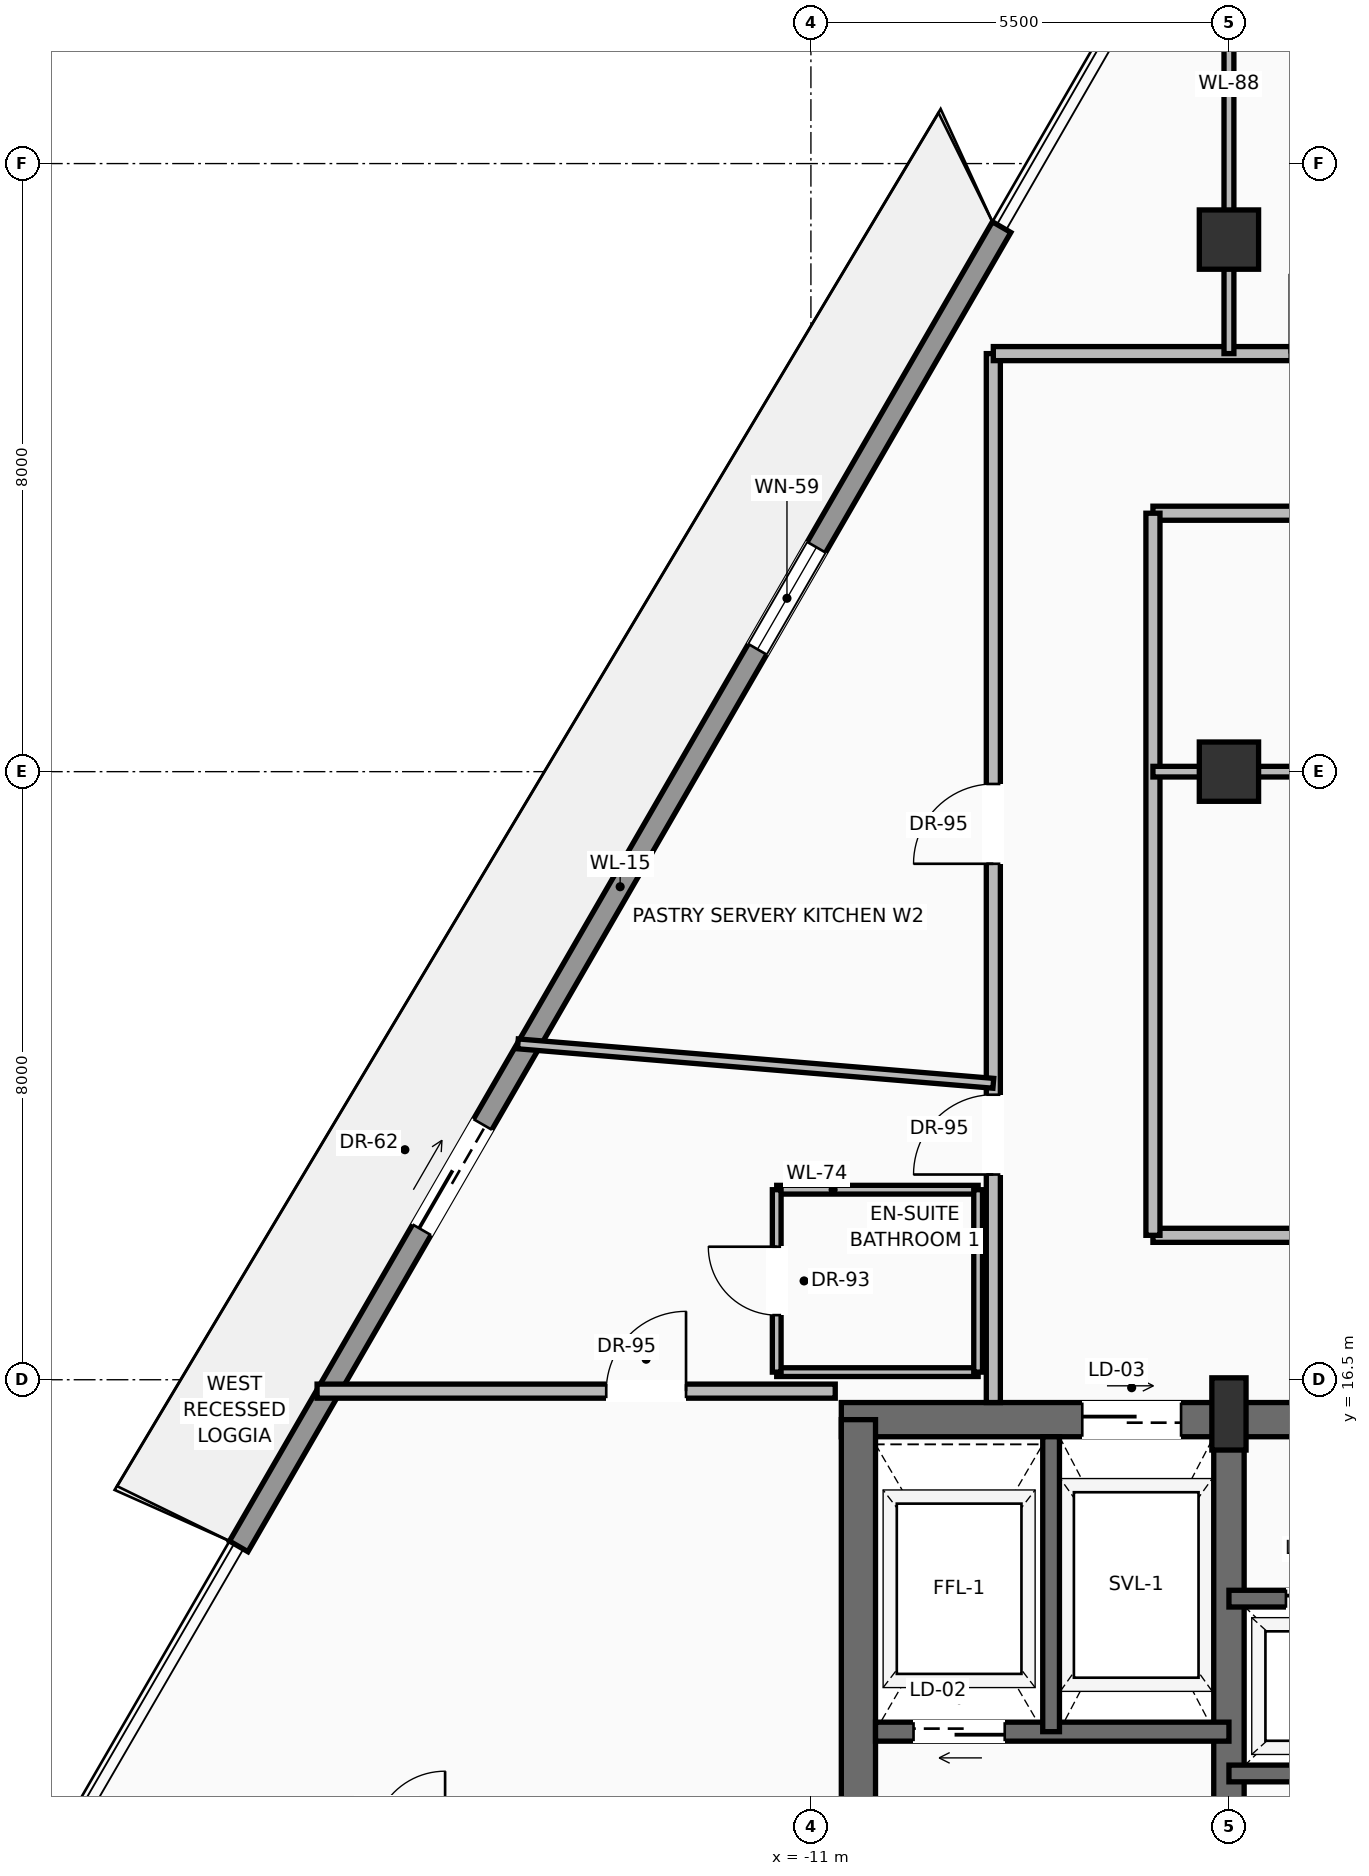
"""IFC4 building model, lengths in metres.
Left out: names, types, materials, properties, quantities, classifications, styles, units other than length and angle.
Written with IfcOpenShell. Run it as: python <this file> out.ifc"""

import sys

from ifc_helpers import new_model, si_unit, direction, frame, frame_2d, origin, origin_2d, place, context, subcontext, project, spatial, rectangle, extrude, source, transform, mapped, element, fill, save


model = new_model("IFC4")
c1 = context("Model", 3, precision=1e-05, world=origin(), true_north=direction((0.0, 1.0)))
c2 = subcontext(c1, "Body", "Model", "MODEL_VIEW")
j1 = project(units=[si_unit("LENGTHUNIT", "METRE"), si_unit("PLANEANGLEUNIT", "RADIAN")], contexts=[c1])
p1 = place(None, origin())
s1 = spatial("IfcSite", under=j1, at=p1, CompositionType="ELEMENT")
p2 = place(p1, origin())
s2 = spatial("IfcBuilding", under=s1, at=p2, CompositionType="ELEMENT")
p3 = place(p2, frame((0.0, 0.0, 273.0)))
s3 = spatial("IfcBuildingStorey", under=s2, at=p3, CompositionType="ELEMENT", Elevation=273.0)
p4 = place(p3, frame((-10.6, 15.975, 0.0), z_axis=(0.0, 0.0, 1.0), x_axis=(1.0, 0.0, 0.0)))
e1 = element("IfcWall", 1, at=p4, inside=s3, PredefinedType="SHEAR", context=c2, shape_type="SweptSolid", body=[
    extrude(rectangle(XDim=21.2, YDim=0.45, at=frame_2d((10.6, 0.0))), origin(), (0.0, 0.0, 1.0), 3.24),
])
p5 = place(p4, frame((3.17, 0.0, 0.0)))
e2 = element("IfcOpeningElement", 2, at=p5, cuts=e1, PredefinedType="OPENING", context=c2, shape_type="SweptSolid", body=[
    extrude(rectangle(XDim=1.3, YDim=2.3, at=frame_2d((0.65, 1.15))), frame((0.0, 0.235, 0.0), z_axis=(0.0, -1.0, 0.0), x_axis=(1.0, 0.0, 0.0)), (0.0, 0.0, 1.0), 0.47),
])
p6 = place(p4, frame((9.6, 0.0, 0.0)))
e3 = element("IfcOpeningElement", 3, at=p6, cuts=e1, PredefinedType="OPENING", context=c2, shape_type="SweptSolid", body=[
    extrude(rectangle(XDim=2.0, YDim=2.4, at=frame_2d((1.0, 1.2))), frame((0.0, 0.235, 0.0), z_axis=(0.0, -1.0, 0.0), x_axis=(1.0, 0.0, 0.0)), (0.0, 0.0, 1.0), 0.47),
])
p7 = place(p3, frame((-10.375, 0.625, 0.0), z_axis=(0.0, 0.0, 1.0), x_axis=(0.0, 1.0, 0.0)))
e4 = element("IfcWall", 4, at=p7, inside=s3, PredefinedType="SHEAR", context=c2, shape_type="SweptSolid", body=[
    extrude(rectangle(XDim=15.35, YDim=0.45, at=frame_2d((7.675, 0.0))), origin(), (0.0, 0.0, 1.0), 3.24),
])
p8 = place(p3, frame((-5.5, 0.625, 0.0), z_axis=(0.0, 0.0, 1.0), x_axis=(0.0, 1.0, 0.0)))
e5 = element("IfcWall", 5, at=p8, inside=s3, PredefinedType="SHEAR", context=c2, shape_type="SweptSolid", body=[
    extrude(rectangle(XDim=15.35, YDim=0.4, at=frame_2d((7.675, 0.0))), origin(), (0.0, 0.0, 1.0), 3.24),
])
p9 = place(p8, frame((8.875, 0.0, 0.0)))
e6 = element("IfcOpeningElement", 6, at=p9, cuts=e5, PredefinedType="OPENING", context=c2, shape_type="SweptSolid", body=[
    extrude(rectangle(XDim=1.1, YDim=2.2, at=frame_2d((0.55, 1.1))), frame((0.0, 0.21, 0.0), z_axis=(0.0, -1.0, 0.0), x_axis=(1.0, 0.0, 0.0)), (0.0, 0.0, 1.0), 0.42),
])
m1 = source(origin(), c2, "Body", "SweptSolid", [
    extrude(rectangle(XDim=0.45, YDim=0.95, at=origin_2d()), origin(), (0.0, 0.0, 1.0), 3.45),
])
p10 = place(p3, frame((-5.5, 16.05, 0.0), z_axis=(0.0, 0.0, 1.0), x_axis=(1.0, 0.0, 0.0)))
e7 = element("IfcColumn", 7, at=p10, inside=s3, PredefinedType="PILASTER", context=c2, shape_type="MappedRepresentation", body=[
    mapped(m1, transform((0.0, 0.0, 0.0), scale=1.0)),
])
m2 = source(origin(), c2, "Body", "SweptSolid", [
    extrude(rectangle(XDim=0.78, YDim=0.78, at=origin_2d()), origin(), (0.0, 0.0, 1.0), 3.45),
])
for number, where, z_axis, x_axis in (
    (8, (-5.5, 24.5, 0.0), (0.0, 0.0, 1.0), (1.0, 0.0, 0.0)),
    (9, (-5.5, 31.5, 0.0), (0.0, 0.0, 1.0), (1.0, 0.0, 0.0)),
):
    element("IfcColumn", number, at=place(p3, frame(where, z_axis=z_axis, x_axis=x_axis)), inside=s3, PredefinedType="COLUMN", context=c2, shape_type="MappedRepresentation", body=[
        mapped(m2, transform((0.0, 0.0, 0.0), scale=1.0)),
    ])
p11 = place(p3, frame((-18.529, 14.308, 0.0), z_axis=(0.0, 0.0, 1.0), x_axis=(0.500615740451, 0.86566961389, 0.0)))
e10 = element("IfcWall", 10, at=p11, inside=s3, PredefinedType="SOLIDWALL", context=c2, shape_type="SweptSolid", body=[
    extrude(rectangle(XDim=20.05, YDim=0.28, at=frame_2d((10.025, 0.0))), origin(), (0.0, 0.0, 1.0), 2.82),
])
p12 = place(p11, frame((4.812, 0.0, 0.0)))
e11 = element("IfcOpeningElement", 11, at=p12, cuts=e10, PredefinedType="OPENING", context=c2, shape_type="SweptSolid", body=[
    extrude(rectangle(XDim=1.6, YDim=2.35, at=frame_2d((0.8, 1.175))), frame((0.0, 0.15, 0.0), z_axis=(0.0, -1.0, 0.0), x_axis=(1.0, 0.0, 0.0)), (0.0, 0.0, 1.0), 0.3),
])
p13 = place(p11, frame((13.634, 0.0, 0.9)))
e12 = element("IfcOpeningElement", 12, at=p13, cuts=e10, PredefinedType="OPENING", context=c2, shape_type="SweptSolid", body=[
    extrude(rectangle(XDim=1.55, YDim=1.75, at=frame_2d((0.775, 0.875))), frame((0.0, 0.15, 0.0), z_axis=(0.0, -1.0, 0.0), x_axis=(1.0, 0.0, 0.0)), (0.0, 0.0, 1.0), 0.3),
])
p14 = place(p3, frame((-5.5, 11.87, 0.0), z_axis=(0.0, 0.0, 1.0), x_axis=(-1.0, 0.0, 0.0)))
e13 = element("IfcWall", 13, at=p14, inside=s3, PredefinedType="SOLIDWALL", context=c2, shape_type="SweptSolid", body=[
    extrude(rectangle(XDim=4.65, YDim=0.25, at=frame_2d((2.325, 0.0))), origin(), (0.0, 0.0, 1.0), 3.24),
])
p15 = place(p14, frame((2.95, 0.0, 0.0)))
e14 = element("IfcOpeningElement", 14, at=p15, cuts=e13, PredefinedType="OPENING", context=c2, shape_type="SweptSolid", body=[
    extrude(rectangle(XDim=1.2, YDim=2.25, at=frame_2d((0.6, 1.125))), frame((0.0, 0.135, 0.0), z_axis=(0.0, -1.0, 0.0), x_axis=(1.0, 0.0, 0.0)), (0.0, 0.0, 1.0), 0.27),
])
p16 = place(p3, frame((-7.84, 11.87, 0.0), z_axis=(0.0, 0.0, 1.0), x_axis=(0.0, 1.0, 0.0)))
e15 = element("IfcWall", 15, at=p16, inside=s3, PredefinedType="SOLIDWALL", context=c2, shape_type="SweptSolid", body=[
    extrude(rectangle(XDim=3.88, YDim=0.22, at=frame_2d((1.94, 0.0))), origin(), (0.0, 0.0, 1.0), 3.24),
])
p17 = place(p3, frame((-5.5, 11.32, 0.0), z_axis=(0.0, 0.0, 1.0), x_axis=(1.0, 0.0, 0.0)))
e16 = element("IfcWall", 16, at=p17, inside=s3, PredefinedType="SOLIDWALL", context=c2, shape_type="SweptSolid", body=[
    extrude(rectangle(XDim=7.32, YDim=0.22, at=frame_2d((3.66, 0.0))), origin(), (0.0, 0.0, 1.0), 3.24),
])
p18 = place(p3, frame((-5.5, 13.62, 0.0), z_axis=(0.0, 0.0, 1.0), x_axis=(1.0, 0.0, 0.0)))
e17 = element("IfcWall", 17, at=p18, inside=s3, PredefinedType="SOLIDWALL", context=c2, shape_type="SweptSolid", body=[
    extrude(rectangle(XDim=7.32, YDim=0.22, at=frame_2d((3.66, 0.0))), origin(), (0.0, 0.0, 1.0), 3.24),
])
p19 = place(p18, frame((0.75, 0.0, 0.0)))
e18 = element("IfcOpeningElement", 18, at=p19, cuts=e17, PredefinedType="OPENING", context=c2, shape_type="SweptSolid", body=[
    extrude(rectangle(XDim=1.1, YDim=2.2, at=frame_2d((0.55, 1.1))), frame((0.0, 0.12, 0.0), z_axis=(0.0, -1.0, 0.0), x_axis=(1.0, 0.0, 0.0)), (0.0, 0.0, 1.0), 0.24),
])
p20 = place(p18, frame((3.15, 0.0, 0.0)))
e19 = element("IfcOpeningElement", 19, at=p20, cuts=e17, PredefinedType="OPENING", context=c2, shape_type="SweptSolid", body=[
    extrude(rectangle(XDim=1.1, YDim=2.2, at=frame_2d((0.55, 1.1))), frame((0.0, 0.12, 0.0), z_axis=(0.0, -1.0, 0.0), x_axis=(1.0, 0.0, 0.0)), (0.0, 0.0, 1.0), 0.24),
])
p21 = place(p18, frame((5.55, 0.0, 0.0)))
e20 = element("IfcOpeningElement", 20, at=p21, cuts=e17, PredefinedType="OPENING", context=c2, shape_type="SweptSolid", body=[
    extrude(rectangle(XDim=1.1, YDim=2.2, at=frame_2d((0.55, 1.1))), frame((0.0, 0.12, 0.0), z_axis=(0.0, -1.0, 0.0), x_axis=(1.0, 0.0, 0.0)), (0.0, 0.0, 1.0), 0.24),
])
p22 = place(p3, frame((-6.5, 18.4, 0.0), z_axis=(0.0, 0.0, 1.0), x_axis=(1.0, 0.0, 0.0)))
e21 = element("IfcWall", 21, at=p22, inside=s3, PredefinedType="PARTITIONING", context=c2, shape_type="SweptSolid", body=[
    extrude(rectangle(XDim=12.45, YDim=0.185, at=frame_2d((6.225, 0.0))), origin(), (0.0, 0.0, 1.0), 3.232),
])
p23 = place(p22, frame((5.75, 0.0, 0.0)))
e22 = element("IfcOpeningElement", 22, at=p23, cuts=e21, PredefinedType="OPENING", context=c2, shape_type="SweptSolid", body=[
    extrude(rectangle(XDim=0.95, YDim=2.2, at=frame_2d((0.475, 1.1))), frame((0.0, 0.103, 0.0), z_axis=(0.0, -1.0, 0.0), x_axis=(1.0, 0.0, 0.0)), (0.0, 0.0, 1.0), 0.205),
])
p24 = place(p3, frame((-6.5, 27.9, 0.0), z_axis=(0.0, 0.0, 1.0), x_axis=(1.0, 0.0, 0.0)))
e23 = element("IfcWall", 23, at=p24, inside=s3, PredefinedType="PARTITIONING", context=c2, shape_type="SweptSolid", body=[
    extrude(rectangle(XDim=12.45, YDim=0.185, at=frame_2d((6.225, 0.0))), origin(), (0.0, 0.0, 1.0), 2.885),
])
p25 = place(p24, frame((5.75, 0.0, 0.0)))
e24 = element("IfcOpeningElement", 24, at=p25, cuts=e23, PredefinedType="OPENING", context=c2, shape_type="SweptSolid", body=[
    extrude(rectangle(XDim=0.95, YDim=2.2, at=frame_2d((0.475, 1.1))), frame((0.0, 0.103, 0.0), z_axis=(0.0, -1.0, 0.0), x_axis=(1.0, 0.0, 0.0)), (0.0, 0.0, 1.0), 0.205),
])
p26 = place(p3, frame((-6.5, 18.4, 0.0), z_axis=(0.0, 0.0, 1.0), x_axis=(0.0, 1.0, 0.0)))
e25 = element("IfcWall", 25, at=p26, inside=s3, PredefinedType="PARTITIONING", context=c2, shape_type="SweptSolid", body=[
    extrude(rectangle(XDim=9.5, YDim=0.185, at=frame_2d((4.75, 0.0))), origin(), (0.0, 0.0, 1.0), 3.232),
])
p27 = place(p3, frame((-8.6, 16.2, 0.0), z_axis=(0.0, 0.0, 1.0), x_axis=(0.0, 1.0, 0.0)))
e26 = element("IfcWall", 26, at=p27, inside=s3, PredefinedType="PARTITIONING", context=c2, shape_type="SweptSolid", body=[
    extrude(rectangle(XDim=13.8, YDim=0.185, at=frame_2d((6.9, 0.0))), origin(), (0.0, 0.0, 1.0), 3.232),
])
p28 = place(p27, frame((3.0, 0.0, 0.0)))
e27 = element("IfcOpeningElement", 27, at=p28, cuts=e26, PredefinedType="OPENING", context=c2, shape_type="SweptSolid", body=[
    extrude(rectangle(XDim=1.05, YDim=2.25, at=frame_2d((0.525, 1.125))), frame((0.0, 0.103, 0.0), z_axis=(0.0, -1.0, 0.0), x_axis=(1.0, 0.0, 0.0)), (0.0, 0.0, 1.0), 0.205),
])
p29 = place(p27, frame((7.088, 0.0, 0.0)))
e28 = element("IfcOpeningElement", 28, at=p29, cuts=e26, PredefinedType="OPENING", context=c2, shape_type="SweptSolid", body=[
    extrude(rectangle(XDim=1.05, YDim=2.25, at=frame_2d((0.525, 1.125))), frame((0.0, 0.103, 0.0), z_axis=(0.0, -1.0, 0.0), x_axis=(1.0, 0.0, 0.0)), (0.0, 0.0, 1.0), 0.205),
])
p30 = place(p3, frame((-8.6, 30.0, 0.0), z_axis=(0.0, 0.0, 1.0), x_axis=(1.0, 0.0, 0.0)))
e29 = element("IfcWall", 29, at=p30, inside=s3, PredefinedType="PARTITIONING", context=c2, shape_type="SweptSolid", body=[
    extrude(rectangle(XDim=16.65, YDim=0.185, at=frame_2d((8.325, 0.0))), origin(), (0.0, 0.0, 1.0), 3.232),
])
p31 = place(p30, frame((3.9, 0.0, 0.0)))
e30 = element("IfcOpeningElement", 30, at=p31, cuts=e29, PredefinedType="OPENING", context=c2, shape_type="SweptSolid", body=[
    extrude(rectangle(XDim=1.05, YDim=2.25, at=frame_2d((0.525, 1.125))), frame((0.0, 0.103, 0.0), z_axis=(0.0, -1.0, 0.0), x_axis=(1.0, 0.0, 0.0)), (0.0, 0.0, 1.0), 0.205),
])
p32 = place(p30, frame((7.8, 0.0, 0.0)))
e31 = element("IfcOpeningElement", 31, at=p32, cuts=e29, PredefinedType="OPENING", context=c2, shape_type="SweptSolid", body=[
    extrude(rectangle(XDim=1.05, YDim=2.25, at=frame_2d((0.525, 1.125))), frame((0.0, 0.103, 0.0), z_axis=(0.0, -1.0, 0.0), x_axis=(1.0, 0.0, 0.0)), (0.0, 0.0, 1.0), 0.205),
])
p33 = place(p30, frame((12.25, 0.0, 0.0)))
e32 = element("IfcOpeningElement", 32, at=p33, cuts=e29, PredefinedType="OPENING", context=c2, shape_type="SweptSolid", body=[
    extrude(rectangle(XDim=1.05, YDim=2.25, at=frame_2d((0.525, 1.125))), frame((0.0, 0.103, 0.0), z_axis=(0.0, -1.0, 0.0), x_axis=(1.0, 0.0, 0.0)), (0.0, 0.0, 1.0), 0.205),
])
p34 = place(p3, frame((-6.5, 24.5, 0.0), z_axis=(0.0, 0.0, 1.0), x_axis=(1.0, 0.0, 0.0)))
e33 = element("IfcWall", 33, at=p34, inside=s3, PredefinedType="PARTITIONING", context=c2, shape_type="SweptSolid", body=[
    extrude(rectangle(XDim=12.45, YDim=0.14, at=frame_2d((6.225, 0.0))), origin(), (0.0, 0.0, 1.0), 2.683),
])
p35 = place(p3, frame((-17.498, 16.35, 0.0), z_axis=(0.0, 0.0, 1.0), x_axis=(1.0, 0.0, 0.0)))
e34 = element("IfcWall", 34, at=p35, inside=s3, PredefinedType="PARTITIONING", context=c2, shape_type="SweptSolid", body=[
    extrude(rectangle(XDim=6.818, YDim=0.185, at=frame_2d((3.409, 0.0))), origin(), (0.0, 0.0, 1.0), 3.232),
])
p36 = place(p35, frame((3.804, 0.0, 0.0)))
e35 = element("IfcOpeningElement", 35, at=p36, cuts=e34, PredefinedType="OPENING", context=c2, shape_type="SweptSolid", body=[
    extrude(rectangle(XDim=1.05, YDim=2.25, at=frame_2d((0.525, 1.125))), frame((0.0, 0.103, 0.0), z_axis=(0.0, -1.0, 0.0), x_axis=(1.0, 0.0, 0.0)), (0.0, 0.0, 1.0), 0.205),
])
p37 = place(p3, frame((-5.5, 30.0, 0.0), z_axis=(0.0, 0.0, 1.0), x_axis=(0.0, 1.0, 0.0)))
e36 = element("IfcWall", 36, at=p37, inside=s3, PredefinedType="PARTITIONING", context=c2, shape_type="SweptSolid", body=[
    extrude(rectangle(XDim=7.096, YDim=0.13, at=frame_2d((3.548, 0.0))), origin(), (0.0, 0.0, 1.0), 2.683),
])
for number, where, z_axis, x_axis in (
    (37, (-11.45, 16.6, 0.0), (0.0, 0.0, 1.0), (1.0, 0.0, 0.0)),
    (38, (-11.45, 19.0, 0.0), (0.0, 0.0, 1.0), (1.0, 0.0, 0.0)),
):
    element("IfcWall", number, at=place(p3, frame(where, z_axis=z_axis, x_axis=x_axis)), inside=s3, PredefinedType="PARTITIONING", context=c2, shape_type="SweptSolid", body=[
        extrude(rectangle(XDim=2.65, YDim=0.115, at=frame_2d((1.325, 0.0))), origin(), (0.0, 0.0, 1.0), 3.232),
    ])
p38 = place(p3, frame((-11.45, 16.6, 0.0), z_axis=(0.0, 0.0, 1.0), x_axis=(0.0, 1.0, 0.0)))
e39 = element("IfcWall", 39, at=p38, inside=s3, PredefinedType="PARTITIONING", context=c2, shape_type="SweptSolid", body=[
    extrude(rectangle(XDim=2.4, YDim=0.115, at=frame_2d((1.2, 0.0))), origin(), (0.0, 0.0, 1.0), 3.232),
])
p39 = place(p38, frame((0.75, 0.0, 0.0)))
e40 = element("IfcOpeningElement", 40, at=p39, cuts=e39, PredefinedType="OPENING", context=c2, shape_type="SweptSolid", body=[
    extrude(rectangle(XDim=0.9, YDim=2.15, at=frame_2d((0.45, 1.075))), frame((0.0, 0.067, 0.0), z_axis=(0.0, -1.0, 0.0), x_axis=(1.0, 0.0, 0.0)), (0.0, 0.0, 1.0), 0.135),
])
p40 = place(p3, frame((-8.8, 16.6, 0.0), z_axis=(0.0, 0.0, 1.0), x_axis=(0.0, 1.0, 0.0)))
e41 = element("IfcWall", 41, at=p40, inside=s3, PredefinedType="PARTITIONING", context=c2, shape_type="SweptSolid", body=[
    extrude(rectangle(XDim=2.4, YDim=0.115, at=frame_2d((1.2, 0.0))), origin(), (0.0, 0.0, 1.0), 3.232),
])
p41 = place(p3, frame((-14.855, 20.919, 0.0), z_axis=(0.0, 0.0, 1.0), x_axis=(0.996575202115, -0.082691393322, 0.0)))
e42 = element("IfcWall", 42, at=p41, inside=s3, PredefinedType="PARTITIONING", context=c2, shape_type="SweptSolid", body=[
    extrude(rectangle(XDim=6.277, YDim=0.13, at=frame_2d((3.138, 0.0))), origin(), (0.0, 0.0, 1.0), 3.232),
])
m3 = source(origin(), c2, "Body", "SweptSolid", [
    extrude(rectangle(XDim=1.6, YDim=2.35, at=frame_2d((0.8, 1.175))), frame((0.0, 0.025, 0.0), z_axis=(0.0, -1.0, 0.0), x_axis=(1.0, 0.0, 0.0)), (0.0, 0.0, 1.0), 0.05),
])
p42 = place(p12, origin())
e43 = element("IfcDoor", 43, at=p42, inside=s3, OperationType="SLIDING_TO_LEFT", PredefinedType="DOOR", context=c2, shape_type="MappedRepresentation", body=[
    mapped(m3, transform((0.0, 0.0, 0.0), scale=1.0)),
])
fill(e11, e43)
m4 = source(origin(), c2, "Body", "SweptSolid", [
    extrude(rectangle(XDim=1.55, YDim=1.75, at=frame_2d((0.775, 0.875))), frame((0.0, 0.03, 0.0), z_axis=(0.0, -1.0, 0.0), x_axis=(1.0, 0.0, 0.0)), (0.0, 0.0, 1.0), 0.06),
])
p43 = place(p13, origin())
e44 = element("IfcWindow", 44, at=p43, inside=s3, PartitioningType="SINGLE_PANEL", PredefinedType="WINDOW", context=c2, shape_type="MappedRepresentation", body=[
    mapped(m4, transform((0.0, 0.0, 0.0), scale=1.0)),
])
fill(e12, e44)
m5 = source(origin(), c2, "Body", "SweptSolid", [
    extrude(rectangle(XDim=1.2, YDim=2.25, at=frame_2d((0.6, 1.125))), frame((0.0, 0.025, 0.0), z_axis=(0.0, -1.0, 0.0), x_axis=(1.0, 0.0, 0.0)), (0.0, 0.0, 1.0), 0.05),
])
p44 = place(p15, origin())
e45 = element("IfcDoor", 45, at=p44, inside=s3, OperationType="SLIDING_TO_LEFT", PredefinedType="DOOR", context=c2, shape_type="MappedRepresentation", body=[
    mapped(m5, transform((0.0, 0.0, 0.0), scale=1.0)),
])
fill(e14, e45)
m6 = source(origin(), c2, "Body", "SweptSolid", [
    extrude(rectangle(XDim=1.3, YDim=2.3, at=frame_2d((0.65, 1.15))), frame((0.0, 0.025, 0.0), z_axis=(0.0, -1.0, 0.0), x_axis=(1.0, 0.0, 0.0)), (0.0, 0.0, 1.0), 0.05),
])
p45 = place(p5, origin())
e46 = element("IfcDoor", 46, at=p45, inside=s3, OperationType="SLIDING_TO_RIGHT", PredefinedType="DOOR", context=c2, shape_type="MappedRepresentation", body=[
    mapped(m6, transform((0.0, 0.0, 0.0), scale=1.0)),
])
fill(e2, e46)
m7 = source(origin(), c2, "Body", "SweptSolid", [
    extrude(rectangle(XDim=1.1, YDim=2.2, at=frame_2d((0.55, 1.1))), frame((0.0, 0.025, 0.0), z_axis=(0.0, -1.0, 0.0), x_axis=(1.0, 0.0, 0.0)), (0.0, 0.0, 1.0), 0.05),
])
p46 = place(p19, origin())
e47 = element("IfcDoor", 47, at=p46, inside=s3, OperationType="SLIDING_TO_RIGHT", PredefinedType="DOOR", context=c2, shape_type="MappedRepresentation", body=[
    mapped(m7, transform((0.0, 0.0, 0.0), scale=1.0)),
])
fill(e18, e47)
m8 = source(origin(), c2, "Body", "SweptSolid", [
    extrude(rectangle(XDim=1.05, YDim=2.25, at=frame_2d((0.525, 1.125))), frame((0.0, 0.025, 0.0), z_axis=(0.0, -1.0, 0.0), x_axis=(1.0, 0.0, 0.0)), (0.0, 0.0, 1.0), 0.05),
])
p47 = place(p36, origin())
e48 = element("IfcDoor", 48, at=p47, inside=s3, OperationType="SINGLE_SWING_RIGHT", PredefinedType="DOOR", context=c2, shape_type="MappedRepresentation", body=[
    mapped(m8, transform((0.0, 0.0, 0.0), scale=1.0)),
])
fill(e35, e48)
p48 = place(p28, origin())
e49 = element("IfcDoor", 49, at=p48, inside=s3, OperationType="SINGLE_SWING_LEFT", PredefinedType="DOOR", context=c2, shape_type="MappedRepresentation", body=[
    mapped(m8, transform((0.0, 0.0, 0.0), scale=1.0)),
])
fill(e27, e49)
m9 = source(origin(), c2, "Body", "SweptSolid", [
    extrude(rectangle(XDim=0.9, YDim=2.15, at=frame_2d((0.45, 1.075))), frame((0.0, 0.025, 0.0), z_axis=(0.0, -1.0, 0.0), x_axis=(1.0, 0.0, 0.0)), (0.0, 0.0, 1.0), 0.05),
])
p49 = place(p39, origin())
e50 = element("IfcDoor", 50, at=p49, inside=s3, OperationType="SINGLE_SWING_RIGHT", PredefinedType="DOOR", context=c2, shape_type="MappedRepresentation", body=[
    mapped(m9, transform((0.0, 0.0, 0.0), scale=1.0)),
])
fill(e40, e50)
p50 = place(p29, origin())
e51 = element("IfcDoor", 51, at=p50, inside=s3, OperationType="SINGLE_SWING_LEFT", PredefinedType="DOOR", context=c2, shape_type="MappedRepresentation", body=[
    mapped(m8, transform((0.0, 0.0, 0.0), scale=1.0)),
])
fill(e28, e51)
save(model, sys.argv[1])
